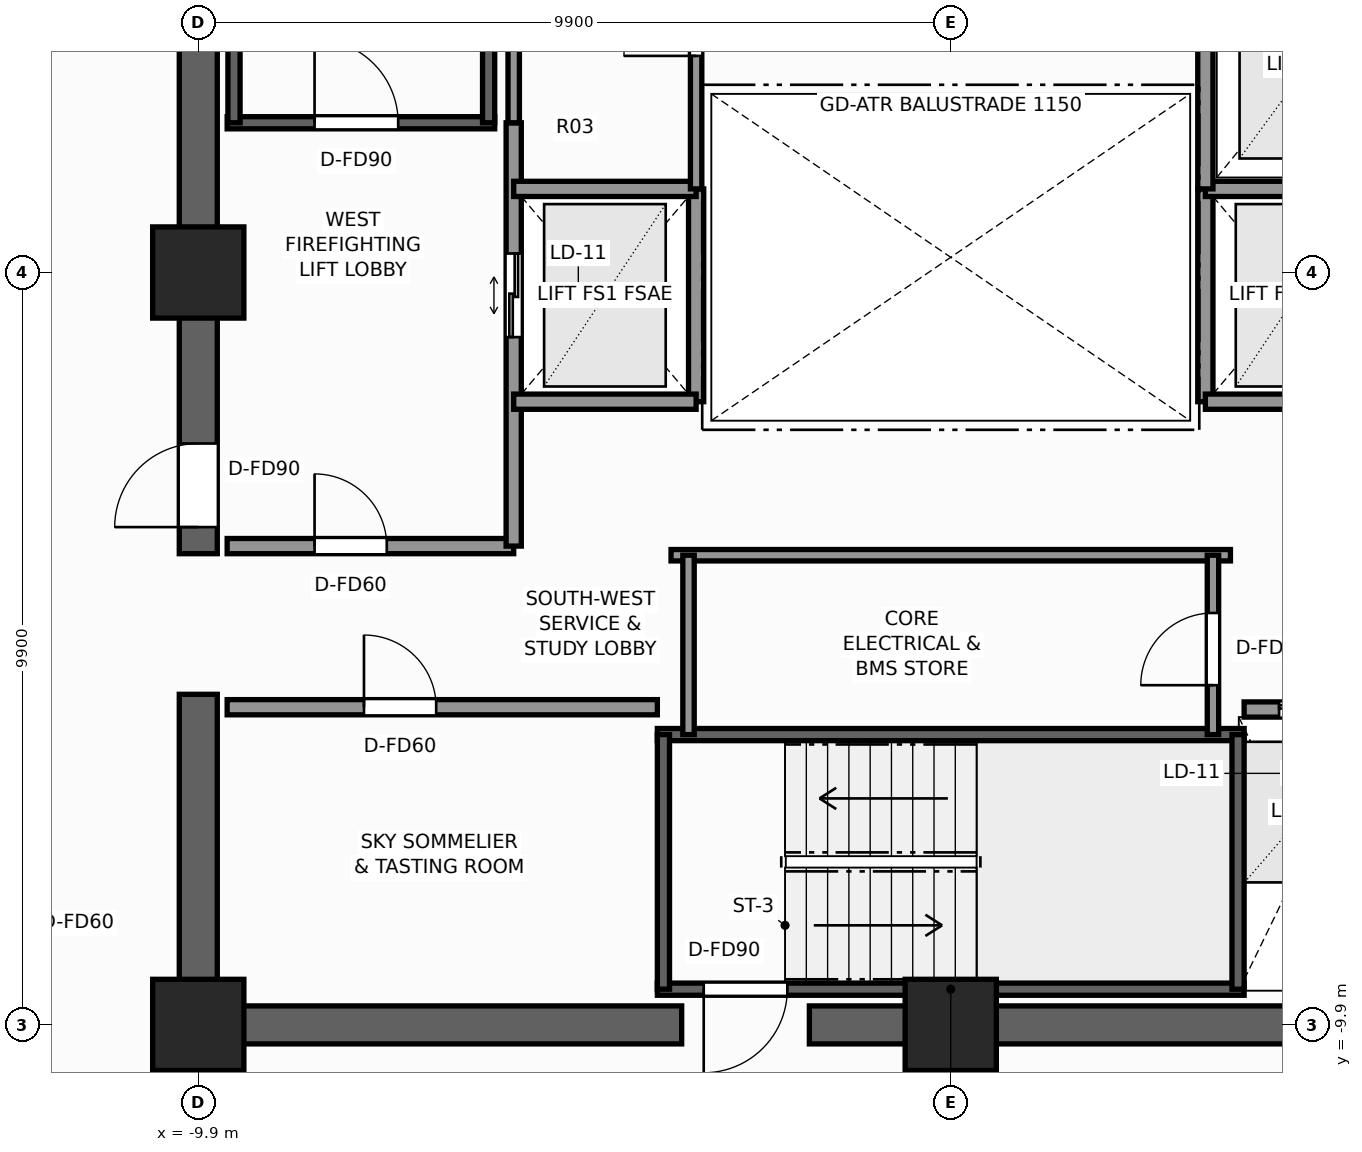
"""IFC4 building model, lengths in metres.
Left out: names, types, materials, properties, quantities, classifications, styles, units other than length and angle.
Written with IfcOpenShell. Run it as: python <this file> out.ifc"""

import sys

from ifc_helpers import new_model, si_unit, direction, frame, frame_2d, origin, origin_2d, place, context, subcontext, project, spatial, rectangle, extrude, element, fill, save


model = new_model("IFC4")
c1 = context("Model", 3, precision=1e-05, world=origin(), true_north=direction((0.0, 1.0)))
c2 = subcontext(c1, "Body", "Model", "MODEL_VIEW")
j1 = project(units=[si_unit("LENGTHUNIT", "METRE"), si_unit("PLANEANGLEUNIT", "RADIAN")], contexts=[c1])
p1 = place(None, origin())
s1 = spatial("IfcSite", under=j1, at=p1, CompositionType="ELEMENT")
p2 = place(p1, origin())
s2 = spatial("IfcBuilding", under=s1, at=p2, CompositionType="ELEMENT")
p3 = place(p2, frame((0.0, 0.0, 176.7)))
s3 = spatial("IfcBuildingStorey", under=s2, at=p3, CompositionType="ELEMENT", Elevation=176.7)
p4 = place(p3, frame((10.15, -9.9, 0.0), z_axis=(0.0, 0.0, 1.0), x_axis=(-1.0, 0.0, 0.0)))
e1 = element("IfcWall", 1, at=p4, inside=s3, PredefinedType="SHEAR", context=c2, shape_type="SweptSolid", body=[
    extrude(rectangle(XDim=12.01, YDim=0.5, at=frame_2d((6.005, 0.0))), origin(), (0.0, 0.0, 1.0), 3.3),
])
p5 = place(p3, frame((-3.54, -9.9, 0.0), z_axis=(0.0, 0.0, 1.0), x_axis=(-1.0, 0.0, 0.0)))
e2 = element("IfcWall", 2, at=p5, inside=s3, PredefinedType="SHEAR", context=c2, shape_type="SweptSolid", body=[
    extrude(rectangle(XDim=6.61, YDim=0.5, at=frame_2d((3.305, 0.0))), origin(), (0.0, 0.0, 1.0), 3.3),
])
p6 = place(p3, frame((-9.9, -9.65, 0.0), z_axis=(0.0, 0.0, 1.0), x_axis=(0.0, 1.0, 0.0)))
e3 = element("IfcWall", 3, at=p6, inside=s3, PredefinedType="SHEAR", context=c2, shape_type="SweptSolid", body=[
    extrude(rectangle(XDim=4.1, YDim=0.5, at=frame_2d((2.05, 0.0))), origin(), (0.0, 0.0, 1.0), 3.3),
])
p7 = place(p3, frame((-9.9, -3.7, 0.0), z_axis=(0.0, 0.0, 1.0), x_axis=(0.0, 1.0, 0.0)))
e4 = element("IfcWall", 4, at=p7, inside=s3, PredefinedType="SHEAR", context=c2, shape_type="SweptSolid", body=[
    extrude(rectangle(XDim=13.35, YDim=0.5, at=frame_2d((6.675, 0.0))), origin(), (0.0, 0.0, 1.0), 3.3),
])
p8 = place(p7, frame((0.35, 0.0, 0.0)))
e5 = element("IfcOpeningElement", 5, at=p8, cuts=e4, PredefinedType="OPENING", context=c2, shape_type="SweptSolid", body=[
    extrude(rectangle(XDim=1.1, YDim=2.2, at=frame_2d((0.55, 1.1))), frame((0.0, 0.26, 0.0), z_axis=(0.0, -1.0, 0.0), x_axis=(1.0, 0.0, 0.0)), (0.0, 0.0, 1.0), 0.52),
])
for number, where, z_axis, x_axis in (
    (6, (-9.9, -9.9, 0.0), (0.0, 0.0, 1.0), (1.0, 0.0, 0.0)),
    (7, (0.0, -9.9, 0.0), (0.0, 0.0, 1.0), (1.0, 0.0, 0.0)),
    (8, (-9.9, 0.0, 0.0), (0.0, 0.0, 1.0), (1.0, 0.0, 0.0)),
):
    element("IfcColumn", number, at=place(p3, frame(where, z_axis=z_axis, x_axis=x_axis)), inside=s3, PredefinedType="COLUMN", context=c2, shape_type="SweptSolid", body=[
        extrude(rectangle(XDim=1.2, YDim=1.2, at=origin_2d()), origin(), (0.0, 0.0, 1.0), 3.3),
    ])
p9 = place(p3, frame((-9.52, 1.97, 0.0), z_axis=(0.0, 0.0, 1.0), x_axis=(1.0, 0.0, 0.0)))
e9 = element("IfcWall", 9, at=p9, inside=s3, PredefinedType="SHEAR", context=c2, shape_type="SweptSolid", body=[
    extrude(rectangle(XDim=3.52, YDim=0.16, at=frame_2d((1.76, 0.0))), origin(), (0.0, 0.0, 1.0), 3.3),
])
p10 = place(p9, frame((1.15, 0.0, 0.0)))
e10 = element("IfcOpeningElement", 10, at=p10, cuts=e9, PredefinedType="OPENING", context=c2, shape_type="SweptSolid", body=[
    extrude(rectangle(XDim=1.1, YDim=2.2, at=frame_2d((0.55, 1.1))), frame((0.0, 0.09, 0.0), z_axis=(0.0, -1.0, 0.0), x_axis=(1.0, 0.0, 0.0)), (0.0, 0.0, 1.0), 0.18),
])
for number, where, z_axis, x_axis in (
    (11, (-9.43, 1.97, 0.0), (0.0, 0.0, 1.0), (0.0, 1.0, 0.0)),
    (12, (-6.08, 1.97, 0.0), (0.0, 0.0, 1.0), (0.0, 1.0, 0.0)),
):
    element("IfcWall", number, at=place(p3, frame(where, z_axis=z_axis, x_axis=x_axis)), inside=s3, PredefinedType="SHEAR", context=c2, shape_type="SweptSolid", body=[
        extrude(rectangle(XDim=7.56, YDim=0.16, at=frame_2d((3.78, 0.0))), origin(), (0.0, 0.0, 1.0), 3.3),
    ])
p11 = place(p3, frame((3.86, -9.43, 0.0), z_axis=(0.0, 0.0, 1.0), x_axis=(-1.0, 0.0, 0.0)))
e13 = element("IfcWall", 13, at=p11, inside=s3, PredefinedType="SHEAR", context=c2, shape_type="SweptSolid", body=[
    extrude(rectangle(XDim=7.72, YDim=0.16, at=frame_2d((3.86, 0.0))), origin(), (0.0, 0.0, 1.0), 3.3),
])
p12 = place(p11, frame((6.01, 0.0, 0.0)))
e14 = element("IfcOpeningElement", 14, at=p12, cuts=e13, PredefinedType="OPENING", context=c2, shape_type="SweptSolid", body=[
    extrude(rectangle(XDim=1.1, YDim=2.2, at=frame_2d((0.55, 1.1))), frame((0.0, 0.09, 0.0), z_axis=(0.0, -1.0, 0.0), x_axis=(1.0, 0.0, 0.0)), (0.0, 0.0, 1.0), 0.18),
])
p13 = place(p3, frame((-3.86, -6.08, 0.0), z_axis=(0.0, 0.0, 1.0), x_axis=(1.0, 0.0, 0.0)))
e15 = element("IfcWall", 15, at=p13, inside=s3, PredefinedType="SHEAR", context=c2, shape_type="SweptSolid", body=[
    extrude(rectangle(XDim=7.72, YDim=0.16, at=frame_2d((3.86, 0.0))), origin(), (0.0, 0.0, 1.0), 3.3),
])
for number, where, z_axis, x_axis in (
    (16, (-3.78, -9.43, 0.0), (0.0, 0.0, 1.0), (0.0, 1.0, 0.0)),
    (17, (3.78, -9.43, 0.0), (0.0, 0.0, 1.0), (0.0, 1.0, 0.0)),
):
    element("IfcWall", number, at=place(p3, frame(where, z_axis=z_axis, x_axis=x_axis)), inside=s3, PredefinedType="SHEAR", context=c2, shape_type="SweptSolid", body=[
        extrude(rectangle(XDim=3.35, YDim=0.16, at=frame_2d((1.675, 0.0))), origin(), (0.0, 0.0, 1.0), 3.3),
    ])
p14 = place(p3, frame((-9.52, -3.6, 0.0), z_axis=(0.0, 0.0, 1.0), x_axis=(1.0, 0.0, 0.0)))
e18 = element("IfcWall", 18, at=p14, inside=s3, PredefinedType="SOLIDWALL", context=c2, shape_type="SweptSolid", body=[
    extrude(rectangle(XDim=3.77, YDim=0.2, at=frame_2d((1.885, 0.0))), origin(), (0.0, 0.0, 1.0), 3.08),
])
p15 = place(p14, frame((1.15, 0.0, 0.0)))
e19 = element("IfcOpeningElement", 19, at=p15, cuts=e18, PredefinedType="OPENING", context=c2, shape_type="SweptSolid", body=[
    extrude(rectangle(XDim=0.95, YDim=2.06, at=frame_2d((0.475, 1.03))), frame((0.0, 0.11, 0.0), z_axis=(0.0, -1.0, 0.0), x_axis=(1.0, 0.0, 0.0)), (0.0, 0.0, 1.0), 0.22),
])
p16 = place(p3, frame((-5.75, -3.6, 0.0), z_axis=(0.0, 0.0, 1.0), x_axis=(0.0, 1.0, 0.0)))
e20 = element("IfcWall", 20, at=p16, inside=s3, PredefinedType="SOLIDWALL", context=c2, shape_type="SweptSolid", body=[
    extrude(rectangle(XDim=5.57, YDim=0.2, at=frame_2d((2.785, 0.0))), origin(), (0.0, 0.0, 1.0), 2.715),
])
p17 = place(p16, frame((2.75, 0.0, 0.0)))
e21 = element("IfcOpeningElement", 21, at=p17, cuts=e20, PredefinedType="OPENING", context=c2, shape_type="SweptSolid", body=[
    extrude(rectangle(XDim=1.1, YDim=2.2, at=frame_2d((0.55, 1.1))), frame((0.0, 0.11, 0.0), z_axis=(0.0, -1.0, 0.0), x_axis=(1.0, 0.0, 0.0)), (0.0, 0.0, 1.0), 0.22),
])
p18 = place(p3, frame((-3.35, -1.7, 0.0), z_axis=(0.0, 0.0, 1.0), x_axis=(0.0, 1.0, 0.0)))
e22 = element("IfcWall", 22, at=p18, inside=s3, PredefinedType="SOLIDWALL", context=c2, shape_type="SweptSolid", body=[
    extrude(rectangle(XDim=2.8, YDim=0.2, at=frame_2d((1.4, 0.0))), origin(), (0.0, 0.0, 1.0), 2.715),
])
for number, where, z_axis, x_axis in (
    (23, (-5.75, -1.7, 0.0), (0.0, 0.0, 1.0), (1.0, 0.0, 0.0)),
    (24, (-5.75, 1.1, 0.0), (0.0, 0.0, 1.0), (1.0, 0.0, 0.0)),
):
    element("IfcWall", number, at=place(p3, frame(where, z_axis=z_axis, x_axis=x_axis)), inside=s3, PredefinedType="SOLIDWALL", context=c2, shape_type="SweptSolid", body=[
        extrude(rectangle(XDim=2.4, YDim=0.2, at=frame_2d((1.2, 0.0))), origin(), (0.0, 0.0, 1.0), 3.08),
    ])
p19 = place(p3, frame((3.35, -1.7, 0.0), z_axis=(0.0, 0.0, 1.0), x_axis=(0.0, 1.0, 0.0)))
e25 = element("IfcWall", 25, at=p19, inside=s3, PredefinedType="SOLIDWALL", context=c2, shape_type="SweptSolid", body=[
    extrude(rectangle(XDim=2.8, YDim=0.2, at=frame_2d((1.4, 0.0))), origin(), (0.0, 0.0, 1.0), 2.715),
])
for number, where, z_axis, x_axis in (
    (26, (3.35, -1.7, 0.0), (0.0, 0.0, 1.0), (1.0, 0.0, 0.0)),
    (27, (3.35, 1.1, 0.0), (0.0, 0.0, 1.0), (1.0, 0.0, 0.0)),
):
    element("IfcWall", number, at=place(p3, frame(where, z_axis=z_axis, x_axis=x_axis)), inside=s3, PredefinedType="SOLIDWALL", context=c2, shape_type="SweptSolid", body=[
        extrude(rectangle(XDim=2.4, YDim=0.2, at=frame_2d((1.2, 0.0))), origin(), (0.0, 0.0, 1.0), 3.08),
    ])
p20 = place(p3, frame((3.35, 1.1, 0.0), z_axis=(0.0, 0.0, 1.0), x_axis=(0.0, 1.0, 0.0)))
e28 = element("IfcWall", 28, at=p20, inside=s3, PredefinedType="SOLIDWALL", context=c2, shape_type="SweptSolid", body=[
    extrude(rectangle(XDim=3.2, YDim=0.2, at=frame_2d((1.6, 0.0))), origin(), (0.0, 0.0, 1.0), 2.715),
])
p21 = place(p3, frame((-9.52, -5.72, 0.0), z_axis=(0.0, 0.0, 1.0), x_axis=(1.0, 0.0, 0.0)))
e29 = element("IfcWall", 29, at=p21, inside=s3, PredefinedType="SOLIDWALL", context=c2, shape_type="SweptSolid", body=[
    extrude(rectangle(XDim=5.66, YDim=0.2, at=frame_2d((2.83, 0.0))), origin(), (0.0, 0.0, 1.0), 3.08),
])
p22 = place(p21, frame((1.8, 0.0, 0.0)))
e30 = element("IfcOpeningElement", 30, at=p22, cuts=e29, PredefinedType="OPENING", context=c2, shape_type="SweptSolid", body=[
    extrude(rectangle(XDim=0.95, YDim=2.06, at=frame_2d((0.475, 1.03))), frame((0.0, 0.11, 0.0), z_axis=(0.0, -1.0, 0.0), x_axis=(1.0, 0.0, 0.0)), (0.0, 0.0, 1.0), 0.22),
])
p23 = place(p3, frame((3.86, -5.75, 0.0), z_axis=(0.0, 0.0, 1.0), x_axis=(1.0, 0.0, 0.0)))
e31 = element("IfcWall", 31, at=p23, inside=s3, PredefinedType="SOLIDWALL", context=c2, shape_type="SweptSolid", body=[
    extrude(rectangle(XDim=5.66, YDim=0.2, at=frame_2d((2.83, 0.0))), origin(), (0.0, 0.0, 1.0), 3.08),
])
p24 = place(p23, frame((0.46, 0.0, 0.0)))
e32 = element("IfcOpeningElement", 32, at=p24, cuts=e31, PredefinedType="OPENING", context=c2, shape_type="SweptSolid", body=[
    extrude(rectangle(XDim=1.1, YDim=2.2, at=frame_2d((0.55, 1.1))), frame((0.0, 0.11, 0.0), z_axis=(0.0, -1.0, 0.0), x_axis=(1.0, 0.0, 0.0)), (0.0, 0.0, 1.0), 0.22),
])
p25 = place(p23, frame((2.39, 0.0, 0.0)))
e33 = element("IfcOpeningElement", 33, at=p25, cuts=e31, PredefinedType="OPENING", context=c2, shape_type="SweptSolid", body=[
    extrude(rectangle(XDim=1.1, YDim=2.2, at=frame_2d((0.55, 1.1))), frame((0.0, 0.11, 0.0), z_axis=(0.0, -1.0, 0.0), x_axis=(1.0, 0.0, 0.0)), (0.0, 0.0, 1.0), 0.22),
])
p26 = place(p23, frame((4.32, 0.0, 0.0)))
e34 = element("IfcOpeningElement", 34, at=p26, cuts=e31, PredefinedType="OPENING", context=c2, shape_type="SweptSolid", body=[
    extrude(rectangle(XDim=1.1, YDim=2.2, at=frame_2d((0.55, 1.1))), frame((0.0, 0.11, 0.0), z_axis=(0.0, -1.0, 0.0), x_axis=(1.0, 0.0, 0.0)), (0.0, 0.0, 1.0), 0.22),
])
p27 = place(p3, frame((-3.68, -3.72, 0.0), z_axis=(0.0, 0.0, 1.0), x_axis=(1.0, 0.0, 0.0)))
e35 = element("IfcWall", 35, at=p27, inside=s3, PredefinedType="PARTITIONING", context=c2, shape_type="SweptSolid", body=[
    extrude(rectangle(XDim=7.36, YDim=0.15, at=frame_2d((3.68, 0.0))), origin(), (0.0, 0.0, 1.0), 3.08),
])
p28 = place(p3, frame((3.45, -6.08, 0.0), z_axis=(0.0, 0.0, 1.0), x_axis=(0.0, 1.0, 0.0)))
e36 = element("IfcWall", 36, at=p28, inside=s3, PredefinedType="PARTITIONING", context=c2, shape_type="SweptSolid", body=[
    extrude(rectangle(XDim=2.36, YDim=0.15, at=frame_2d((1.18, 0.0))), origin(), (0.0, 0.0, 1.0), 3.08),
])
p29 = place(p28, frame((0.65, 0.0, 0.0)))
e37 = element("IfcOpeningElement", 37, at=p29, cuts=e36, PredefinedType="OPENING", context=c2, shape_type="SweptSolid", body=[
    extrude(rectangle(XDim=0.95, YDim=2.06, at=frame_2d((0.475, 1.03))), frame((0.0, 0.085, 0.0), z_axis=(0.0, -1.0, 0.0), x_axis=(1.0, 0.0, 0.0)), (0.0, 0.0, 1.0), 0.17),
])
p30 = place(p3, frame((-3.45, -6.08, 0.0), z_axis=(0.0, 0.0, 1.0), x_axis=(0.0, 1.0, 0.0)))
e38 = element("IfcWall", 38, at=p30, inside=s3, PredefinedType="PARTITIONING", context=c2, shape_type="SweptSolid", body=[
    extrude(rectangle(XDim=2.36, YDim=0.15, at=frame_2d((1.18, 0.0))), origin(), (0.0, 0.0, 1.0), 3.08),
])
p31 = place(p3, frame((-3.35, 1.1, 0.0), z_axis=(0.0, 0.0, 1.0), x_axis=(0.0, 1.0, 0.0)))
e39 = element("IfcWall", 39, at=p31, inside=s3, PredefinedType="PARTITIONING", context=c2, shape_type="SweptSolid", body=[
    extrude(rectangle(XDim=3.2, YDim=0.15, at=frame_2d((1.6, 0.0))), origin(), (0.0, 0.0, 1.0), 2.715),
])
p32 = place(p31, frame((1.75, 0.0, 0.0)))
e40 = element("IfcOpeningElement", 40, at=p32, cuts=e39, PredefinedType="OPENING", context=c2, shape_type="SweptSolid", body=[
    extrude(rectangle(XDim=0.95, YDim=2.06, at=frame_2d((0.475, 1.03))), frame((0.0, 0.085, 0.0), z_axis=(0.0, -1.0, 0.0), x_axis=(1.0, 0.0, 0.0)), (0.0, 0.0, 1.0), 0.17),
])
p33 = place(p3, frame((-5.75, 1.97, 0.0), z_axis=(0.0, 0.0, 1.0), x_axis=(0.0, 1.0, 0.0)))
e41 = element("IfcWall", 41, at=p33, inside=s3, PredefinedType="PARTITIONING", context=c2, shape_type="SweptSolid", body=[
    extrude(rectangle(XDim=2.33, YDim=0.15, at=frame_2d((1.165, 0.0))), origin(), (0.0, 0.0, 1.0), 2.715),
])
p34 = place(p10, origin())
e42 = element("IfcDoor", 42, at=p34, inside=s3, OperationType="SINGLE_SWING_LEFT", PredefinedType="DOOR", context=c2, shape_type="SweptSolid", body=[
    extrude(rectangle(XDim=1.1, YDim=2.2, at=frame_2d((0.55, 1.1))), frame((0.0, 0.025, 0.0), z_axis=(0.0, -1.0, 0.0), x_axis=(1.0, 0.0, 0.0)), (0.0, 0.0, 1.0), 0.05),
])
fill(e10, e42)
p35 = place(p12, origin())
e43 = element("IfcDoor", 43, at=p35, inside=s3, OperationType="SINGLE_SWING_RIGHT", PredefinedType="DOOR", context=c2, shape_type="SweptSolid", body=[
    extrude(rectangle(XDim=1.1, YDim=2.2, at=frame_2d((0.55, 1.1))), frame((0.0, 0.025, 0.0), z_axis=(0.0, -1.0, 0.0), x_axis=(1.0, 0.0, 0.0)), (0.0, 0.0, 1.0), 0.05),
])
fill(e14, e43)
p36 = place(p8, origin())
e44 = element("IfcDoor", 44, at=p36, inside=s3, OperationType="SINGLE_SWING_LEFT", PredefinedType="DOOR", context=c2, shape_type="SweptSolid", body=[
    extrude(rectangle(XDim=1.1, YDim=2.2, at=frame_2d((0.55, 1.1))), frame((0.0, 0.025, 0.0), z_axis=(0.0, -1.0, 0.0), x_axis=(1.0, 0.0, 0.0)), (0.0, 0.0, 1.0), 0.05),
])
fill(e5, e44)
p37 = place(p17, origin())
e45 = element("IfcDoor", 45, at=p37, inside=s3, OperationType="DOUBLE_DOOR_SLIDING", PredefinedType="DOOR", context=c2, shape_type="SweptSolid", body=[
    extrude(rectangle(XDim=1.1, YDim=2.2, at=frame_2d((0.55, 1.1))), frame((0.0, 0.025, 0.0), z_axis=(0.0, -1.0, 0.0), x_axis=(1.0, 0.0, 0.0)), (0.0, 0.0, 1.0), 0.05),
])
fill(e21, e45)
p38 = place(p22, origin())
e46 = element("IfcDoor", 46, at=p38, inside=s3, OperationType="SINGLE_SWING_LEFT", PredefinedType="DOOR", context=c2, shape_type="SweptSolid", body=[
    extrude(rectangle(XDim=0.95, YDim=2.06, at=frame_2d((0.475, 1.03))), frame((0.0, 0.025, 0.0), z_axis=(0.0, -1.0, 0.0), x_axis=(1.0, 0.0, 0.0)), (0.0, 0.0, 1.0), 0.05),
])
fill(e30, e46)
p39 = place(p15, origin())
e47 = element("IfcDoor", 47, at=p39, inside=s3, OperationType="SINGLE_SWING_LEFT", PredefinedType="DOOR", context=c2, shape_type="SweptSolid", body=[
    extrude(rectangle(XDim=0.95, YDim=2.06, at=frame_2d((0.475, 1.03))), frame((0.0, 0.025, 0.0), z_axis=(0.0, -1.0, 0.0), x_axis=(1.0, 0.0, 0.0)), (0.0, 0.0, 1.0), 0.05),
])
fill(e19, e47)
p40 = place(p24, origin())
e48 = element("IfcDoor", 48, at=p40, inside=s3, OperationType="DOUBLE_DOOR_SLIDING", PredefinedType="DOOR", context=c2, shape_type="SweptSolid", body=[
    extrude(rectangle(XDim=1.1, YDim=2.2, at=frame_2d((0.55, 1.1))), frame((0.0, 0.025, 0.0), z_axis=(0.0, -1.0, 0.0), x_axis=(1.0, 0.0, 0.0)), (0.0, 0.0, 1.0), 0.05),
])
fill(e32, e48)
p41 = place(p29, origin())
e49 = element("IfcDoor", 49, at=p41, inside=s3, OperationType="SINGLE_SWING_LEFT", PredefinedType="DOOR", context=c2, shape_type="SweptSolid", body=[
    extrude(rectangle(XDim=0.95, YDim=2.06, at=frame_2d((0.475, 1.03))), frame((0.0, 0.025, 0.0), z_axis=(0.0, -1.0, 0.0), x_axis=(1.0, 0.0, 0.0)), (0.0, 0.0, 1.0), 0.05),
])
fill(e37, e49)
p42 = place(p32, origin())
e50 = element("IfcDoor", 50, at=p42, inside=s3, OperationType="SINGLE_SWING_LEFT", PredefinedType="DOOR", context=c2, shape_type="SweptSolid", body=[
    extrude(rectangle(XDim=0.95, YDim=2.06, at=frame_2d((0.475, 1.03))), frame((0.0, 0.025, 0.0), z_axis=(0.0, -1.0, 0.0), x_axis=(1.0, 0.0, 0.0)), (0.0, 0.0, 1.0), 0.05),
])
fill(e40, e50)
save(model, sys.argv[1])
